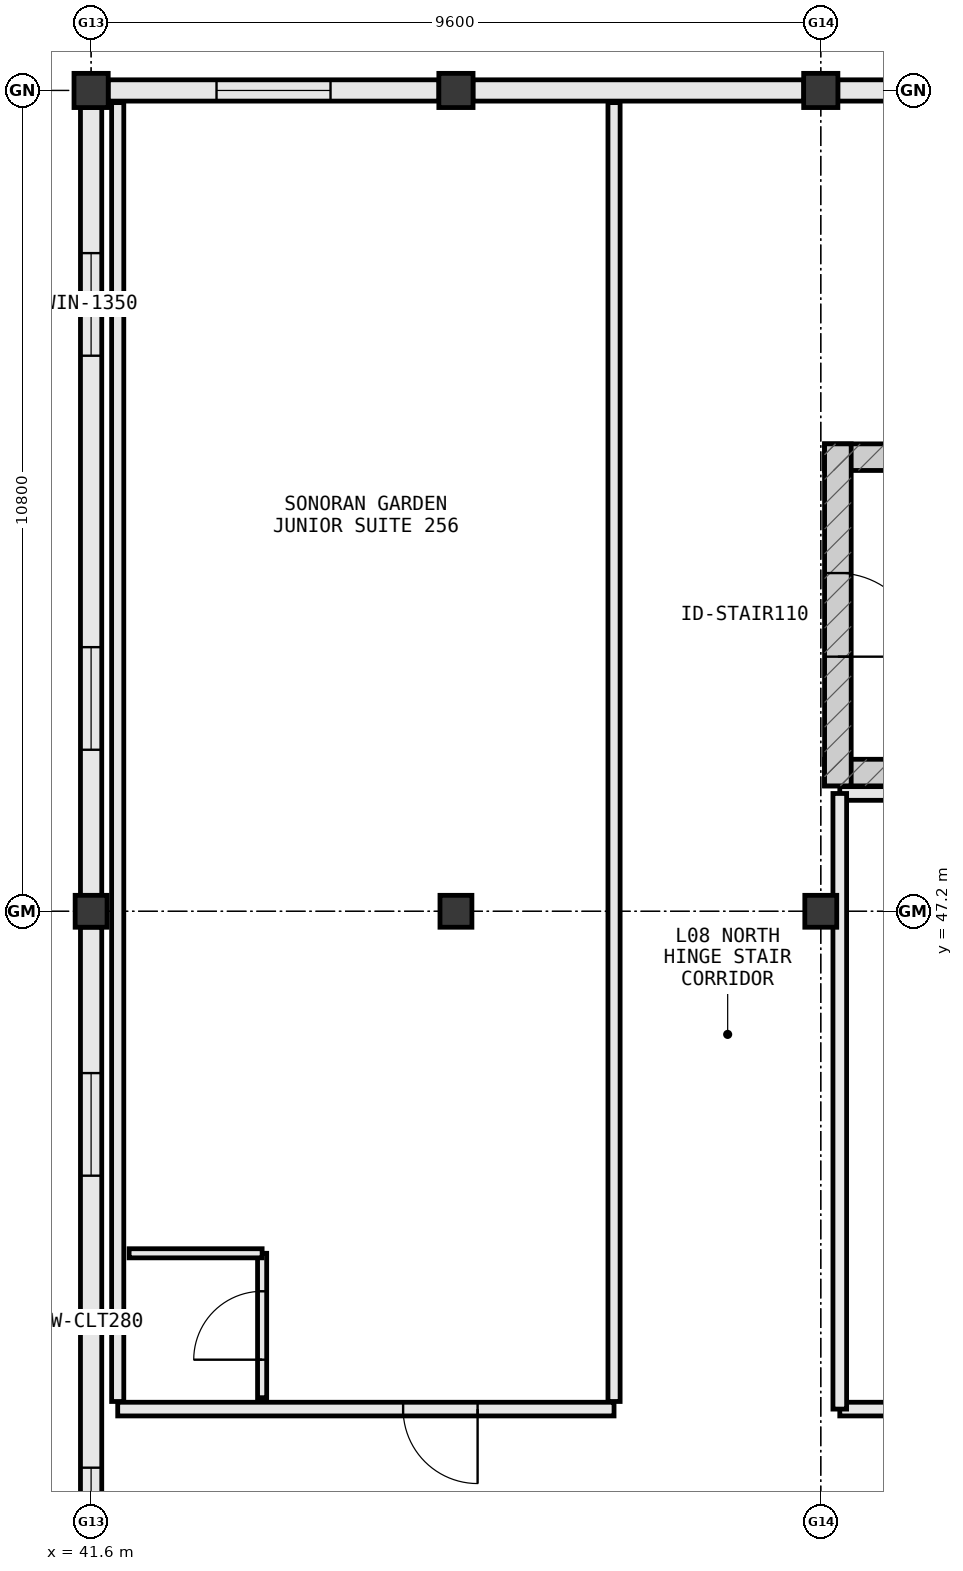
"""IFC4 building model, lengths in metres.
Left out: names, types, materials, properties, quantities, classifications, styles, units other than length and angle.
Written with IfcOpenShell. Run it as: python <this file> out.ifc"""

import sys

from ifc_helpers import new_model, si_unit, direction, frame, frame_2d, origin, origin_2d, place, context, subcontext, project, spatial, rectangle, extrude, element, fill, save


model = new_model("IFC4")
c1 = context("Model", 3, precision=1e-05, world=origin(), true_north=direction((0.0, 1.0)))
c2 = subcontext(c1, "Body", "Model", "MODEL_VIEW")
j1 = project(units=[si_unit("LENGTHUNIT", "METRE"), si_unit("PLANEANGLEUNIT", "RADIAN")], contexts=[c1])
p1 = place(None, origin())
s1 = spatial("IfcSite", under=j1, at=p1, CompositionType="ELEMENT")
p2 = place(p1, origin())
s2 = spatial("IfcBuilding", under=s1, at=p2, CompositionType="ELEMENT")
p3 = place(p2, frame((0.0, 0.0, 35.2)))
s3 = spatial("IfcBuildingStorey", under=s2, at=p3, CompositionType="ELEMENT", Elevation=35.2)
p4 = place(p3, frame((41.6, 58.0, 0.0), z_axis=(0.0, 0.0, 1.0), x_axis=(1.0, 0.0, 0.0)))
e1 = element("IfcColumn", 1, at=p4, inside=s3, PredefinedType="COLUMN", context=c2, shape_type="SweptSolid", body=[
    extrude(rectangle(XDim=0.45, YDim=0.45, at=origin_2d()), origin(), (0.0, 0.0, 1.0), 3.565),
])
p5 = place(p3, frame((41.6, 47.2, 0.0), z_axis=(0.0, 0.0, 1.0), x_axis=(1.0, 0.0, 0.0)))
e2 = element("IfcColumn", 2, at=p5, inside=s3, PredefinedType="COLUMN", context=c2, shape_type="SweptSolid", body=[
    extrude(rectangle(XDim=0.42, YDim=0.42, at=origin_2d()), origin(), (0.0, 0.0, 1.0), 3.565),
])
p6 = place(p3, frame((46.4, 47.2, 0.0), z_axis=(0.0, 0.0, 1.0), x_axis=(1.0, 0.0, 0.0)))
e3 = element("IfcColumn", 3, at=p6, inside=s3, PredefinedType="COLUMN", context=c2, shape_type="SweptSolid", body=[
    extrude(rectangle(XDim=0.42, YDim=0.42, at=origin_2d()), origin(), (0.0, 0.0, 1.0), 3.8),
])
p7 = place(p3, frame((46.4, 58.0, 0.0), z_axis=(0.0, 0.0, 1.0), x_axis=(1.0, 0.0, 0.0)))
e4 = element("IfcColumn", 4, at=p7, inside=s3, PredefinedType="COLUMN", context=c2, shape_type="SweptSolid", body=[
    extrude(rectangle(XDim=0.45, YDim=0.45, at=origin_2d()), origin(), (0.0, 0.0, 1.0), 3.8),
])
p8 = place(p3, frame((51.2, 47.2, 0.0), z_axis=(0.0, 0.0, 1.0), x_axis=(1.0, 0.0, 0.0)))
e5 = element("IfcColumn", 5, at=p8, inside=s3, PredefinedType="COLUMN", context=c2, shape_type="SweptSolid", body=[
    extrude(rectangle(XDim=0.42, YDim=0.42, at=origin_2d()), origin(), (0.0, 0.0, 1.0), 3.8),
])
p9 = place(p3, frame((51.2, 58.0, 0.0), z_axis=(0.0, 0.0, 1.0), x_axis=(1.0, 0.0, 0.0)))
e6 = element("IfcColumn", 6, at=p9, inside=s3, PredefinedType="COLUMN", context=c2, shape_type="SweptSolid", body=[
    extrude(rectangle(XDim=0.45, YDim=0.45, at=origin_2d()), origin(), (0.0, 0.0, 1.0), 3.8),
])
p10 = place(p3, frame((60.577, 58.0, 0.0), z_axis=(0.0, 0.0, 1.0), x_axis=(-1.0, 0.0, 0.0)))
e7 = element("IfcWall", 7, at=p10, inside=s3, PredefinedType="STANDARD", context=c2, shape_type="SweptSolid", body=[
    extrude(rectangle(XDim=9.154, YDim=0.28, at=frame_2d((4.577, 0.0))), origin(), (0.0, 0.0, 1.0), 2.88),
])
p11 = place(p10, frame((1.539, 0.0, 0.85)))
e8 = element("IfcOpeningElement", 8, at=p11, cuts=e7, PredefinedType="OPENING", context=c2, shape_type="SweptSolid", body=[
    extrude(rectangle(XDim=1.5, YDim=1.75, at=frame_2d((0.75, 0.875))), frame((0.0, 0.152, 0.0), z_axis=(0.0, -1.0, 0.0), x_axis=(1.0, 0.0, 0.0)), (0.0, 0.0, 1.0), 0.304),
])
p12 = place(p10, frame((6.115, 0.0, 0.85)))
e9 = element("IfcOpeningElement", 9, at=p12, cuts=e7, PredefinedType="OPENING", context=c2, shape_type="SweptSolid", body=[
    extrude(rectangle(XDim=1.5, YDim=1.75, at=frame_2d((0.75, 0.875))), frame((0.0, 0.152, 0.0), z_axis=(0.0, -1.0, 0.0), x_axis=(1.0, 0.0, 0.0)), (0.0, 0.0, 1.0), 0.304),
])
p13 = place(p3, frame((50.977, 58.0, 0.0), z_axis=(0.0, 0.0, 1.0), x_axis=(-1.0, 0.0, 0.0)))
e10 = element("IfcWall", 10, at=p13, inside=s3, PredefinedType="STANDARD", context=c2, shape_type="SweptSolid", body=[
    extrude(rectangle(XDim=4.354, YDim=0.28, at=frame_2d((2.177, 0.0))), origin(), (0.0, 0.0, 1.0), 2.88),
])
p14 = place(p3, frame((46.177, 58.0, 0.0), z_axis=(0.0, 0.0, 1.0), x_axis=(-1.0, 0.0, 0.0)))
e11 = element("IfcWall", 11, at=p14, inside=s3, PredefinedType="STANDARD", context=c2, shape_type="SweptSolid", body=[
    extrude(rectangle(XDim=4.354, YDim=0.28, at=frame_2d((2.177, 0.0))), origin(), (0.0, 0.0, 1.0), 2.88),
])
p15 = place(p14, frame((1.427, 0.0, 0.85)))
e12 = element("IfcOpeningElement", 12, at=p15, cuts=e11, PredefinedType="OPENING", context=c2, shape_type="SweptSolid", body=[
    extrude(rectangle(XDim=1.5, YDim=1.75, at=frame_2d((0.75, 0.875))), frame((0.0, 0.152, 0.0), z_axis=(0.0, -1.0, 0.0), x_axis=(1.0, 0.0, 0.0)), (0.0, 0.0, 1.0), 0.304),
])
p16 = place(p3, frame((41.6, 57.777, 0.0), z_axis=(0.0, 0.0, 1.0), x_axis=(0.0, -1.0, 0.0)))
e13 = element("IfcWall", 13, at=p16, inside=s3, PredefinedType="STANDARD", context=c2, shape_type="SweptSolid", body=[
    extrude(rectangle(XDim=10.369, YDim=0.28, at=frame_2d((5.185, 0.0))), origin(), (0.0, 0.0, 1.0), 2.92),
])
p17 = place(p16, frame((1.917, 0.0, 0.85)))
e14 = element("IfcOpeningElement", 14, at=p17, cuts=e13, PredefinedType="OPENING", context=c2, shape_type="SweptSolid", body=[
    extrude(rectangle(XDim=1.35, YDim=1.65, at=frame_2d((0.675, 0.825))), frame((0.0, 0.152, 0.0), z_axis=(0.0, -1.0, 0.0), x_axis=(1.0, 0.0, 0.0)), (0.0, 0.0, 1.0), 0.304),
])
p18 = place(p16, frame((7.102, 0.0, 0.85)))
e15 = element("IfcOpeningElement", 15, at=p18, cuts=e13, PredefinedType="OPENING", context=c2, shape_type="SweptSolid", body=[
    extrude(rectangle(XDim=1.35, YDim=1.65, at=frame_2d((0.675, 0.825))), frame((0.0, 0.152, 0.0), z_axis=(0.0, -1.0, 0.0), x_axis=(1.0, 0.0, 0.0)), (0.0, 0.0, 1.0), 0.304),
])
p19 = place(p3, frame((41.6, 46.992, 0.0), z_axis=(0.0, 0.0, 1.0), x_axis=(0.0, -1.0, 0.0)))
e16 = element("IfcWall", 16, at=p19, inside=s3, PredefinedType="STANDARD", context=c2, shape_type="SweptSolid", body=[
    extrude(rectangle(XDim=10.384, YDim=0.28, at=frame_2d((5.192, 0.0))), origin(), (0.0, 0.0, 1.0), 2.92),
])
p20 = place(p19, frame((1.921, 0.0, 0.85)))
e17 = element("IfcOpeningElement", 17, at=p20, cuts=e16, PredefinedType="OPENING", context=c2, shape_type="SweptSolid", body=[
    extrude(rectangle(XDim=1.35, YDim=1.65, at=frame_2d((0.675, 0.825))), frame((0.0, 0.152, 0.0), z_axis=(0.0, -1.0, 0.0), x_axis=(1.0, 0.0, 0.0)), (0.0, 0.0, 1.0), 0.304),
])
p21 = place(p19, frame((7.113, 0.0, 0.85)))
e18 = element("IfcOpeningElement", 18, at=p21, cuts=e16, PredefinedType="OPENING", context=c2, shape_type="SweptSolid", body=[
    extrude(rectangle(XDim=1.35, YDim=1.65, at=frame_2d((0.675, 0.825))), frame((0.0, 0.152, 0.0), z_axis=(0.0, -1.0, 0.0), x_axis=(1.0, 0.0, 0.0)), (0.0, 0.0, 1.0), 0.304),
])
for number, where, z_axis, x_axis in (
    (19, (51.25, 49.025, 0.0), (0.0, 0.0, 1.0), (1.0, 0.0, 0.0)),
    (20, (63.35, 53.175, 0.0), (0.0, 0.0, 1.0), (-1.0, 0.0, 0.0)),
):
    element("IfcWall", number, at=place(p3, frame(where, z_axis=z_axis, x_axis=x_axis)), inside=s3, PredefinedType="SHEAR", context=c2, shape_type="SweptSolid", body=[
        extrude(rectangle(XDim=12.1, YDim=0.35, at=frame_2d((6.05, 0.0))), origin(), (0.0, 0.0, 1.0), 3.565),
    ])
p22 = place(p3, frame((51.425, 53.35, 0.0), z_axis=(0.0, 0.0, 1.0), x_axis=(0.0, -1.0, 0.0)))
e21 = element("IfcWall", 21, at=p22, inside=s3, PredefinedType="SHEAR", context=c2, shape_type="SweptSolid", body=[
    extrude(rectangle(XDim=4.5, YDim=0.35, at=frame_2d((2.25, 0.0))), origin(), (0.0, 0.0, 1.0), 3.565),
])
p23 = place(p22, frame((1.7, 0.0, 0.0)))
e22 = element("IfcOpeningElement", 22, at=p23, cuts=e21, PredefinedType="OPENING", context=c2, shape_type="SweptSolid", body=[
    extrude(rectangle(XDim=1.1, YDim=2.2, at=frame_2d((0.55, 1.1))), frame((0.0, 0.187, 0.0), z_axis=(0.0, -1.0, 0.0), x_axis=(1.0, 0.0, 0.0)), (0.0, 0.0, 1.0), 0.374),
])
p24 = place(p3, frame((51.45, 40.65, 0.0), z_axis=(0.0, 0.0, 1.0), x_axis=(1.0, 0.0, 0.0)))
e23 = element("IfcWall", 23, at=p24, inside=s3, PredefinedType="PARTITIONING", context=c2, shape_type="SweptSolid", body=[
    extrude(rectangle(XDim=11.75, YDim=0.18, at=frame_2d((5.875, 0.0))), origin(), (0.0, 0.0, 1.0), 3.565),
])
p25 = place(p24, frame((5.35, 0.0, 0.0)))
e24 = element("IfcOpeningElement", 24, at=p25, cuts=e23, PredefinedType="OPENING", context=c2, shape_type="SweptSolid", body=[
    extrude(rectangle(XDim=1.05, YDim=2.2, at=frame_2d((0.525, 1.1))), frame((0.0, 0.102, 0.0), z_axis=(0.0, -1.0, 0.0), x_axis=(1.0, 0.0, 0.0)), (0.0, 0.0, 1.0), 0.204),
])
p26 = place(p3, frame((63.2, 48.75, 0.0), z_axis=(0.0, 0.0, 1.0), x_axis=(-1.0, 0.0, 0.0)))
e25 = element("IfcWall", 25, at=p26, inside=s3, PredefinedType="PARTITIONING", context=c2, shape_type="SweptSolid", body=[
    extrude(rectangle(XDim=11.75, YDim=0.18, at=frame_2d((5.875, 0.0))), origin(), (0.0, 0.0, 1.0), 3.565),
])
p27 = place(p3, frame((51.45, 48.75, 0.0), z_axis=(0.0, 0.0, 1.0), x_axis=(0.0, -1.0, 0.0)))
e26 = element("IfcWall", 26, at=p27, inside=s3, PredefinedType="PARTITIONING", context=c2, shape_type="SweptSolid", body=[
    extrude(rectangle(XDim=8.1, YDim=0.18, at=frame_2d((4.05, 0.0))), origin(), (0.0, 0.0, 1.0), 2.92),
])
p28 = place(p3, frame((41.95, 40.65, 0.0), z_axis=(0.0, 0.0, 1.0), x_axis=(1.0, 0.0, 0.0)))
e27 = element("IfcWall", 27, at=p28, inside=s3, PredefinedType="PARTITIONING", context=c2, shape_type="SweptSolid", body=[
    extrude(rectangle(XDim=6.53, YDim=0.18, at=frame_2d((3.265, 0.0))), origin(), (0.0, 0.0, 1.0), 3.565),
])
p29 = place(p28, frame((3.755, 0.0, 0.0)))
e28 = element("IfcOpeningElement", 28, at=p29, cuts=e27, PredefinedType="OPENING", context=c2, shape_type="SweptSolid", body=[
    extrude(rectangle(XDim=0.98, YDim=2.18, at=frame_2d((0.49, 1.09))), frame((0.0, 0.102, 0.0), z_axis=(0.0, -1.0, 0.0), x_axis=(1.0, 0.0, 0.0)), (0.0, 0.0, 1.0), 0.204),
])
p30 = place(p3, frame((41.95, 40.75, 0.0), z_axis=(0.0, 0.0, 1.0), x_axis=(0.0, 1.0, 0.0)))
e29 = element("IfcWall", 29, at=p30, inside=s3, PredefinedType="PARTITIONING", context=c2, shape_type="SweptSolid", body=[
    extrude(rectangle(XDim=17.09, YDim=0.16, at=frame_2d((8.545, 0.0))), origin(), (0.0, 0.0, 1.0), 2.92),
])
p31 = place(p3, frame((48.48, 40.75, 0.0), z_axis=(0.0, 0.0, 1.0), x_axis=(0.0, 1.0, 0.0)))
e30 = element("IfcWall", 30, at=p31, inside=s3, PredefinedType="PARTITIONING", context=c2, shape_type="SweptSolid", body=[
    extrude(rectangle(XDim=17.09, YDim=0.16, at=frame_2d((8.545, 0.0))), origin(), (0.0, 0.0, 1.0), 3.11),
])
p32 = place(p3, frame((43.85, 40.8, 0.0), z_axis=(0.0, 0.0, 1.0), x_axis=(0.0, 1.0, 0.0)))
e31 = element("IfcWall", 31, at=p32, inside=s3, PredefinedType="PARTITIONING", context=c2, shape_type="SweptSolid", body=[
    extrude(rectangle(XDim=1.9, YDim=0.12, at=frame_2d((0.95, 0.0))), origin(), (0.0, 0.0, 1.0), 3.11),
])
p33 = place(p32, frame((0.5, 0.0, 0.0)))
e32 = element("IfcOpeningElement", 32, at=p33, cuts=e31, PredefinedType="OPENING", context=c2, shape_type="SweptSolid", body=[
    extrude(rectangle(XDim=0.9, YDim=2.15, at=frame_2d((0.45, 1.075))), frame((0.0, 0.072, 0.0), z_axis=(0.0, -1.0, 0.0), x_axis=(1.0, 0.0, 0.0)), (0.0, 0.0, 1.0), 0.144),
])
p34 = place(p3, frame((42.1, 42.7, 0.0), z_axis=(0.0, 0.0, 1.0), x_axis=(1.0, 0.0, 0.0)))
e33 = element("IfcWall", 33, at=p34, inside=s3, PredefinedType="PARTITIONING", context=c2, shape_type="SweptSolid", body=[
    extrude(rectangle(XDim=1.75, YDim=0.12, at=frame_2d((0.875, 0.0))), origin(), (0.0, 0.0, 1.0), 3.565),
])
p35 = place(p15, origin())
e34 = element("IfcWindow", 34, at=p35, inside=s3, PartitioningType="SINGLE_PANEL", PredefinedType="WINDOW", context=c2, shape_type="SweptSolid", body=[
    extrude(rectangle(XDim=1.5, YDim=1.75, at=frame_2d((0.75, 0.875))), frame((0.0, 0.03, 0.0), z_axis=(0.0, -1.0, 0.0), x_axis=(1.0, 0.0, 0.0)), (0.0, 0.0, 1.0), 0.06),
])
fill(e12, e34)
p36 = place(p17, origin())
e35 = element("IfcWindow", 35, at=p36, inside=s3, PartitioningType="SINGLE_PANEL", PredefinedType="WINDOW", context=c2, shape_type="SweptSolid", body=[
    extrude(rectangle(XDim=1.35, YDim=1.65, at=frame_2d((0.675, 0.825))), frame((0.0, 0.03, 0.0), z_axis=(0.0, -1.0, 0.0), x_axis=(1.0, 0.0, 0.0)), (0.0, 0.0, 1.0), 0.06),
])
fill(e14, e35)
p37 = place(p18, origin())
e36 = element("IfcWindow", 36, at=p37, inside=s3, PartitioningType="SINGLE_PANEL", PredefinedType="WINDOW", context=c2, shape_type="SweptSolid", body=[
    extrude(rectangle(XDim=1.35, YDim=1.65, at=frame_2d((0.675, 0.825))), frame((0.0, 0.03, 0.0), z_axis=(0.0, -1.0, 0.0), x_axis=(1.0, 0.0, 0.0)), (0.0, 0.0, 1.0), 0.06),
])
fill(e15, e36)
p38 = place(p20, origin())
e37 = element("IfcWindow", 37, at=p38, inside=s3, PartitioningType="SINGLE_PANEL", PredefinedType="WINDOW", context=c2, shape_type="SweptSolid", body=[
    extrude(rectangle(XDim=1.35, YDim=1.65, at=frame_2d((0.675, 0.825))), frame((0.0, 0.03, 0.0), z_axis=(0.0, -1.0, 0.0), x_axis=(1.0, 0.0, 0.0)), (0.0, 0.0, 1.0), 0.06),
])
fill(e17, e37)
p39 = place(p21, origin())
e38 = element("IfcWindow", 38, at=p39, inside=s3, PartitioningType="SINGLE_PANEL", PredefinedType="WINDOW", context=c2, shape_type="SweptSolid", body=[
    extrude(rectangle(XDim=1.35, YDim=1.65, at=frame_2d((0.675, 0.825))), frame((0.0, 0.03, 0.0), z_axis=(0.0, -1.0, 0.0), x_axis=(1.0, 0.0, 0.0)), (0.0, 0.0, 1.0), 0.06),
])
fill(e18, e38)
p40 = place(p23, origin())
e39 = element("IfcDoor", 39, at=p40, inside=s3, OperationType="SINGLE_SWING_RIGHT", PredefinedType="DOOR", context=c2, shape_type="SweptSolid", body=[
    extrude(rectangle(XDim=1.1, YDim=2.2, at=frame_2d((0.55, 1.1))), frame((0.0, 0.025, 0.0), z_axis=(0.0, -1.0, 0.0), x_axis=(1.0, 0.0, 0.0)), (0.0, 0.0, 1.0), 0.05),
])
fill(e22, e39)
p41 = place(p29, frame((0.98, 0.0, 0.0), z_axis=(0.0, 0.0, 1.0), x_axis=(-1.0, 0.0, 0.0)))
e40 = element("IfcDoor", 40, at=p41, inside=s3, OperationType="SINGLE_SWING_RIGHT", PredefinedType="DOOR", context=c2, shape_type="SweptSolid", body=[
    extrude(rectangle(XDim=0.98, YDim=2.18, at=frame_2d((0.49, 1.09))), frame((0.0, 0.025, 0.0), z_axis=(0.0, -1.0, 0.0), x_axis=(1.0, 0.0, 0.0)), (0.0, 0.0, 1.0), 0.05),
])
fill(e28, e40)
p42 = place(p33, origin())
e41 = element("IfcDoor", 41, at=p42, inside=s3, OperationType="SINGLE_SWING_LEFT", PredefinedType="DOOR", context=c2, shape_type="SweptSolid", body=[
    extrude(rectangle(XDim=0.9, YDim=2.15, at=frame_2d((0.45, 1.075))), frame((0.0, 0.025, 0.0), z_axis=(0.0, -1.0, 0.0), x_axis=(1.0, 0.0, 0.0)), (0.0, 0.0, 1.0), 0.05),
])
fill(e32, e41)
save(model, sys.argv[1])
